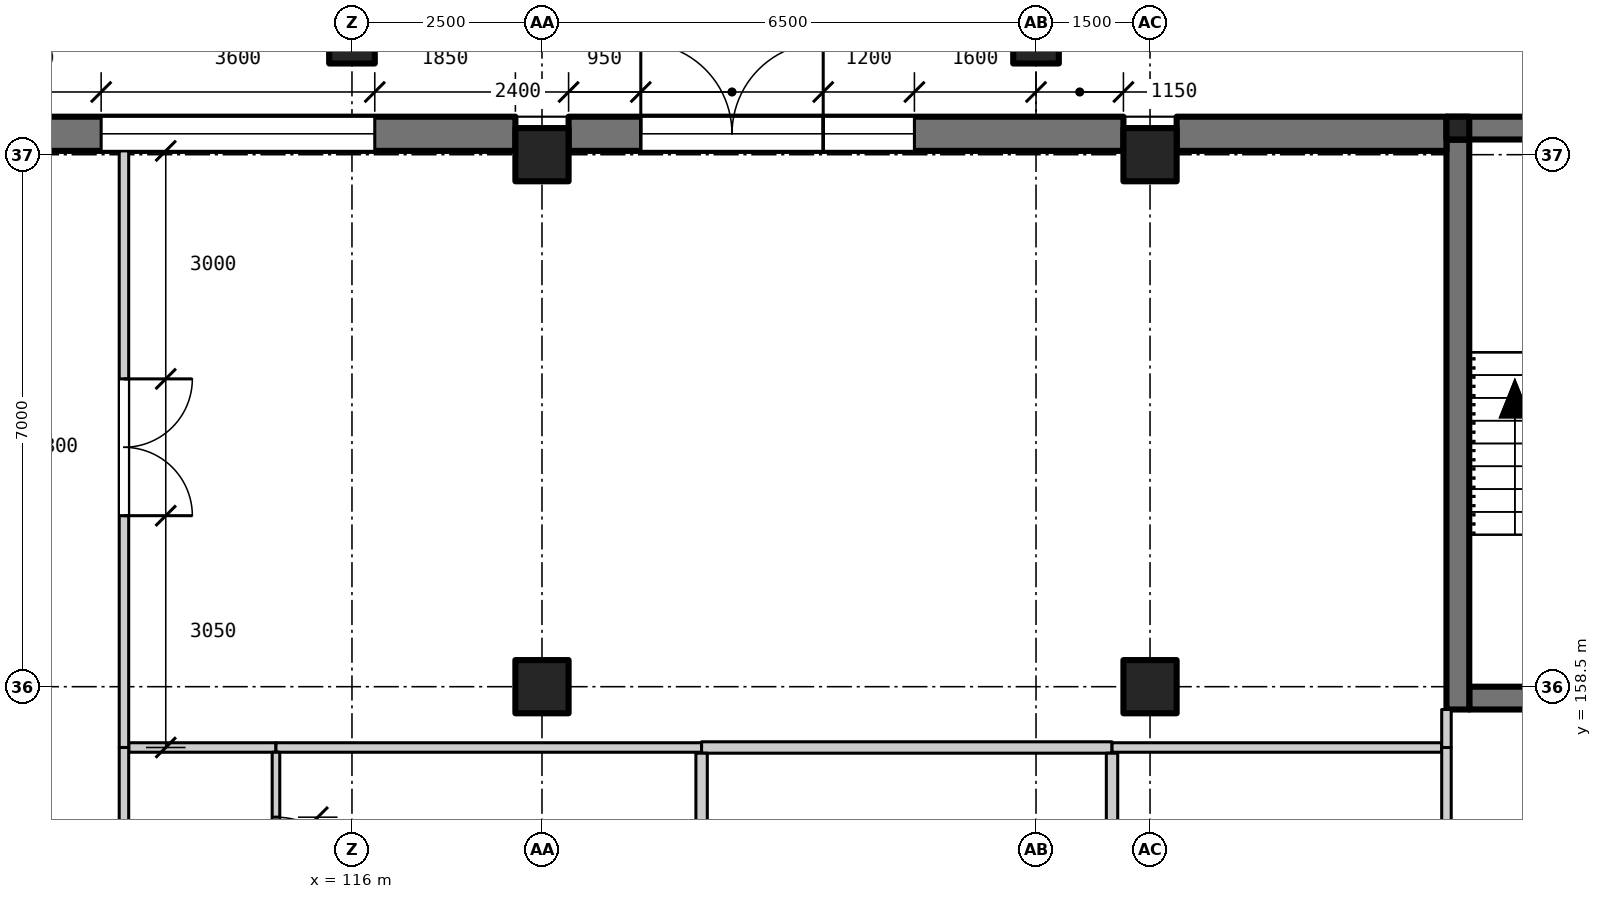
"""IFC4 building model, lengths in metres.
Left out: names, types, materials, properties, quantities, classifications, styles, units other than length and angle.
Written with IfcOpenShell. Run it as: python <this file> out.ifc"""

import sys

from ifc_helpers import new_model, si_unit, direction, frame, frame_2d, origin, origin_2d, place, context, subcontext, project, spatial, rectangle, extrude, element, fill, save


model = new_model("IFC4")
c1 = context("Model", 3, precision=1e-05, world=origin(), true_north=direction((0.0, 1.0)))
c2 = subcontext(c1, "Body", "Model", "MODEL_VIEW")
j1 = project(units=[si_unit("LENGTHUNIT", "METRE"), si_unit("PLANEANGLEUNIT", "RADIAN")], contexts=[c1])
p1 = place(None, origin())
s1 = spatial("IfcSite", under=j1, at=p1, CompositionType="ELEMENT")
p2 = place(p1, origin())
s2 = spatial("IfcBuilding", under=s1, at=p2, CompositionType="ELEMENT")
p3 = place(p2, origin())
s3 = spatial("IfcBuildingStorey", under=s2, at=p3, CompositionType="ELEMENT", Elevation=0.0)
for number, where, z_axis, x_axis in (
    (1, (118.5, 158.5, -1.4), (0.0, 0.0, 1.0), (1.0, 0.0, 0.0)),
    (2, (118.5, 165.5, -1.4), (0.0, 0.0, 1.0), (1.0, 0.0, 0.0)),
    (3, (126.5, 158.5, -1.4), (0.0, 0.0, 1.0), (1.0, 0.0, 0.0)),
    (4, (126.5, 165.5, -1.4), (0.0, 0.0, 1.0), (1.0, 0.0, 0.0)),
):
    element("IfcColumn", number, at=place(p3, frame(where, z_axis=z_axis, x_axis=x_axis)), inside=s3, PredefinedType="COLUMN", context=c2, shape_type="SweptSolid", body=[
        extrude(rectangle(XDim=0.7, YDim=0.7, at=origin_2d()), origin(), (0.0, 0.0, 1.0), 7.4),
    ])
p4 = place(p3, frame((130.55, 165.85, -1.4), z_axis=(0.0, 0.0, 1.0), x_axis=(1.0, 0.0, 0.0)))
e5 = element("IfcColumn", 5, at=p4, inside=s3, PredefinedType="COLUMN", context=c2, shape_type="SweptSolid", body=[
    extrude(rectangle(XDim=0.3, YDim=0.3, at=origin_2d()), origin(), (0.0, 0.0, 1.0), 1.1),
])
for number, where, z_axis, x_axis in (
    (6, (116.0, 167.0, -0.3), (0.0, 0.0, 1.0), (1.0, 0.0, 0.0)),
    (7, (125.0, 167.0, -0.3), (0.0, 0.0, 1.0), (1.0, 0.0, 0.0)),
):
    element("IfcColumn", number, at=place(p3, frame(where, z_axis=z_axis, x_axis=x_axis)), inside=s3, PredefinedType="COLUMN", context=c2, shape_type="SweptSolid", body=[
        extrude(rectangle(XDim=0.6, YDim=0.6, at=origin_2d()), origin(), (0.0, 0.0, 1.0), 6.15),
    ])
p5 = place(p3, frame((130.7, 158.35, -1.4), z_axis=(0.0, 0.0, 1.0), x_axis=(1.0, 0.0, 0.0)))
e8 = element("IfcWall", 8, at=p5, inside=s3, PredefinedType="SHEAR", context=c2, shape_type="SweptSolid", body=[
    extrude(rectangle(XDim=3.0, YDim=0.3, at=frame_2d((1.5, 0.0))), origin(), (0.0, 0.0, 1.0), 7.4),
])
p6 = place(p5, frame((0.95, 0.0, 1.4)))
e9 = element("IfcOpeningElement", 9, at=p6, cuts=e8, PredefinedType="OPENING", context=c2, shape_type="SweptSolid", body=[
    extrude(rectangle(XDim=1.1, YDim=2.1, at=frame_2d((0.55, 1.05))), frame((0.0, 0.16, 0.0), z_axis=(0.0, -1.0, 0.0), x_axis=(1.0, 0.0, 0.0)), (0.0, 0.0, 1.0), 0.32),
])
p7 = place(p3, frame((130.55, 158.2, -1.4), z_axis=(0.0, 0.0, 1.0), x_axis=(0.0, 1.0, 0.0)))
e10 = element("IfcWall", 10, at=p7, inside=s3, PredefinedType="SHEAR", context=c2, shape_type="SweptSolid", body=[
    extrude(rectangle(XDim=7.5, YDim=0.3, at=frame_2d((3.75, 0.0))), origin(), (0.0, 0.0, 1.0), 7.4),
])
p8 = place(p3, frame((130.4, 165.85, 0.0), z_axis=(0.0, 0.0, 1.0), x_axis=(1.0, 0.0, 0.0)))
e11 = element("IfcWall", 11, at=p8, inside=s3, PredefinedType="SOLIDWALL", context=c2, shape_type="SweptSolid", body=[
    extrude(rectangle(XDim=3.6, YDim=0.3, at=frame_2d((1.8, 0.0))), origin(), (0.0, 0.0, 1.0), 5.7),
])
p9 = place(p3, frame((110.85, 165.775, 0.0), z_axis=(0.0, 0.0, 1.0), x_axis=(1.0, 0.0, 0.0)))
e12 = element("IfcWall", 12, at=p9, inside=s3, PredefinedType="SOLIDWALL", context=c2, shape_type="SweptSolid", body=[
    extrude(rectangle(XDim=7.3, YDim=0.45, at=frame_2d((3.65, 0.0))), origin(), (0.0, 0.0, 1.0), 4.9),
])
p10 = place(p9, frame((1.85, 0.0, 0.9)))
e13 = element("IfcOpeningElement", 13, at=p10, cuts=e12, PredefinedType="OPENING", context=c2, shape_type="SweptSolid", body=[
    extrude(rectangle(XDim=3.6, YDim=1.6, at=frame_2d((1.8, 0.8))), frame((0.0, 0.235, 0.0), z_axis=(0.0, -1.0, 0.0), x_axis=(1.0, 0.0, 0.0)), (0.0, 0.0, 1.0), 0.47),
])
p11 = place(p3, frame((118.85, 165.775, 0.0), z_axis=(0.0, 0.0, 1.0), x_axis=(1.0, 0.0, 0.0)))
e14 = element("IfcWall", 14, at=p11, inside=s3, PredefinedType="SOLIDWALL", context=c2, shape_type="SweptSolid", body=[
    extrude(rectangle(XDim=7.3, YDim=0.45, at=frame_2d((3.65, 0.0))), origin(), (0.0, 0.0, 1.0), 4.9),
])
p12 = place(p11, frame((0.95, 0.0, 0.0)))
e15 = element("IfcOpeningElement", 15, at=p12, cuts=e14, PredefinedType="OPENING", context=c2, shape_type="SweptSolid", body=[
    extrude(rectangle(XDim=2.4, YDim=2.4, at=frame_2d((1.2, 1.2))), frame((0.0, 0.235, 0.0), z_axis=(0.0, -1.0, 0.0), x_axis=(1.0, 0.0, 0.0)), (0.0, 0.0, 1.0), 0.47),
])
p13 = place(p11, frame((0.95, 0.0, 2.5)))
e16 = element("IfcOpeningElement", 16, at=p13, cuts=e14, PredefinedType="OPENING", context=c2, shape_type="SweptSolid", body=[
    extrude(rectangle(XDim=2.4, YDim=0.6, at=frame_2d((1.2, 0.3))), frame((0.0, 0.235, 0.0), z_axis=(0.0, -1.0, 0.0), x_axis=(1.0, 0.0, 0.0)), (0.0, 0.0, 1.0), 0.47),
])
p14 = place(p11, frame((3.35, 0.0, 0.4)))
e17 = element("IfcOpeningElement", 17, at=p14, cuts=e14, PredefinedType="OPENING", context=c2, shape_type="SweptSolid", body=[
    extrude(rectangle(XDim=1.2, YDim=3.0, at=frame_2d((0.6, 1.5))), frame((0.0, 0.235, 0.0), z_axis=(0.0, -1.0, 0.0), x_axis=(1.0, 0.0, 0.0)), (0.0, 0.0, 1.0), 0.47),
])
p15 = place(p3, frame((126.85, 165.775, 0.0), z_axis=(0.0, 0.0, 1.0), x_axis=(1.0, 0.0, 0.0)))
e18 = element("IfcWall", 18, at=p15, inside=s3, PredefinedType="SOLIDWALL", context=c2, shape_type="SweptSolid", body=[
    extrude(rectangle(XDim=3.55, YDim=0.45, at=frame_2d((1.775, 0.0))), origin(), (0.0, 0.0, 1.0), 4.9),
])
p16 = place(p3, frame((113.062, 157.7, 0.0), z_axis=(0.0, 0.0, 1.0), x_axis=(1.0, 0.0, 0.0)))
e19 = element("IfcWall", 19, at=p16, inside=s3, PredefinedType="PARTITIONING", context=c2, shape_type="SweptSolid", body=[
    extrude(rectangle(XDim=1.938, YDim=0.125, at=frame_2d((0.969, 0.0))), origin(), (0.0, 0.0, 1.0), 5.7),
])
p17 = place(p3, frame((115.0, 157.7, 0.0), z_axis=(0.0, 0.0, 1.0), x_axis=(1.0, 0.0, 0.0)))
e20 = element("IfcWall", 20, at=p17, inside=s3, PredefinedType="PARTITIONING", context=c2, shape_type="SweptSolid", body=[
    extrude(rectangle(XDim=5.6, YDim=0.125, at=frame_2d((2.8, 0.0))), origin(), (0.0, 0.0, 1.0), 5.7),
])
p18 = place(p3, frame((120.6, 157.7, 0.0), z_axis=(0.0, 0.0, 1.0), x_axis=(1.0, 0.0, 0.0)))
e21 = element("IfcWall", 21, at=p18, inside=s3, PredefinedType="PARTITIONING", context=c2, shape_type="SweptSolid", body=[
    extrude(rectangle(XDim=5.4, YDim=0.15, at=frame_2d((2.7, 0.0))), origin(), (0.0, 0.0, 1.0), 5.7),
])
p19 = place(p3, frame((126.0, 157.7, 0.0), z_axis=(0.0, 0.0, 1.0), x_axis=(1.0, 0.0, 0.0)))
e22 = element("IfcWall", 22, at=p19, inside=s3, PredefinedType="PARTITIONING", context=c2, shape_type="SweptSolid", body=[
    extrude(rectangle(XDim=4.337, YDim=0.125, at=frame_2d((2.169, 0.0))), origin(), (0.0, 0.0, 1.0), 5.7),
])
p20 = place(p3, frame((113.0, 149.41, 0.0), z_axis=(0.0, 0.0, 1.0), x_axis=(0.0, 1.0, 0.0)))
e23 = element("IfcWall", 23, at=p20, inside=s3, PredefinedType="PARTITIONING", context=c2, shape_type="SweptSolid", body=[
    extrude(rectangle(XDim=8.29, YDim=0.125, at=frame_2d((4.145, 0.0))), origin(), (0.0, 0.0, 1.0), 5.7),
])
p21 = place(p3, frame((113.0, 157.7, 0.0), z_axis=(0.0, 0.0, 1.0), x_axis=(0.0, 1.0, 0.0)))
e24 = element("IfcWall", 24, at=p21, inside=s3, PredefinedType="PARTITIONING", context=c2, shape_type="SweptSolid", body=[
    extrude(rectangle(XDim=7.85, YDim=0.125, at=frame_2d((3.925, 0.0))), origin(), (0.0, 0.0, 1.0), 5.7),
])
p22 = place(p21, frame((3.05, 0.0, 0.0)))
e25 = element("IfcOpeningElement", 25, at=p22, cuts=e24, PredefinedType="OPENING", context=c2, shape_type="SweptSolid", body=[
    extrude(rectangle(XDim=1.8, YDim=2.1, at=frame_2d((0.9, 1.05))), frame((0.0, 0.073, 0.0), z_axis=(0.0, -1.0, 0.0), x_axis=(1.0, 0.0, 0.0)), (0.0, 0.0, 1.0), 0.145),
])
p23 = place(p3, frame((115.0, 154.933, 0.0), z_axis=(0.0, 0.0, 1.0), x_axis=(0.0, 1.0, 0.0)))
e26 = element("IfcWall", 26, at=p23, inside=s3, PredefinedType="PARTITIONING", context=c2, shape_type="SweptSolid", body=[
    extrude(rectangle(XDim=2.704, YDim=0.1, at=frame_2d((1.352, 0.0))), origin(), (0.0, 0.0, 1.0), 5.7),
])
p24 = place(p23, frame((0.85, 0.0, 0.0)))
e27 = element("IfcOpeningElement", 27, at=p24, cuts=e26, PredefinedType="OPENING", context=c2, shape_type="SweptSolid", body=[
    extrude(rectangle(XDim=1.0, YDim=2.1, at=frame_2d((0.5, 1.05))), frame((0.0, 0.06, 0.0), z_axis=(0.0, -1.0, 0.0), x_axis=(1.0, 0.0, 0.0)), (0.0, 0.0, 1.0), 0.12),
])
p25 = place(p3, frame((120.6, 154.933, 0.0), z_axis=(0.0, 0.0, 1.0), x_axis=(0.0, 1.0, 0.0)))
e28 = element("IfcWall", 28, at=p25, inside=s3, PredefinedType="PARTITIONING", context=c2, shape_type="SweptSolid", body=[
    extrude(rectangle(XDim=2.692, YDim=0.15, at=frame_2d((1.346, 0.0))), origin(), (0.0, 0.0, 1.0), 5.7),
])
p26 = place(p3, frame((126.0, 149.475, 0.0), z_axis=(0.0, 0.0, 1.0), x_axis=(0.0, 1.0, 0.0)))
e29 = element("IfcWall", 29, at=p26, inside=s3, PredefinedType="PARTITIONING", context=c2, shape_type="SweptSolid", body=[
    extrude(rectangle(XDim=8.15, YDim=0.15, at=frame_2d((4.075, 0.0))), origin(), (0.0, 0.0, 1.0), 5.7),
])
p27 = place(p3, frame((130.4, 149.41, 0.0), z_axis=(0.0, 0.0, 1.0), x_axis=(0.0, 1.0, 0.0)))
e30 = element("IfcWall", 30, at=p27, inside=s3, PredefinedType="PARTITIONING", context=c2, shape_type="SweptSolid", body=[
    extrude(rectangle(XDim=8.29, YDim=0.125, at=frame_2d((4.145, 0.0))), origin(), (0.0, 0.0, 1.0), 5.7),
])
p28 = place(p3, frame((130.4, 157.7, 0.0), z_axis=(0.0, 0.0, 1.0), x_axis=(0.0, 1.0, 0.0)))
e31 = element("IfcWall", 31, at=p28, inside=s3, PredefinedType="PARTITIONING", context=c2, shape_type="SweptSolid", body=[
    extrude(rectangle(XDim=0.5, YDim=0.125, at=frame_2d((0.25, 0.0))), origin(), (0.0, 0.0, 1.0), 5.7),
])
p29 = place(p10, origin())
e32 = element("IfcWindow", 32, at=p29, inside=s3, PartitioningType="SINGLE_PANEL", PredefinedType="WINDOW", context=c2, shape_type="SweptSolid", body=[
    extrude(rectangle(XDim=3.6, YDim=1.6, at=frame_2d((1.8, 0.8))), frame((0.0, -0.125, 0.0), z_axis=(0.0, -1.0, 0.0), x_axis=(1.0, 0.0, 0.0)), (0.0, 0.0, 1.0), 0.06),
])
fill(e13, e32)
p30 = place(p12, origin())
e33 = element("IfcDoor", 33, at=p30, inside=s3, OperationType="DOUBLE_DOOR_DOUBLE_SWING", PredefinedType="DOOR", context=c2, shape_type="SweptSolid", body=[
    extrude(rectangle(XDim=2.4, YDim=2.4, at=frame_2d((1.2, 1.2))), frame((0.0, 0.025, 0.0), z_axis=(0.0, -1.0, 0.0), x_axis=(1.0, 0.0, 0.0)), (0.0, 0.0, 1.0), 0.05),
])
fill(e15, e33)
p31 = place(p13, origin())
e34 = element("IfcWindow", 34, at=p31, inside=s3, PartitioningType="SINGLE_PANEL", PredefinedType="WINDOW", context=c2, shape_type="SweptSolid", body=[
    extrude(rectangle(XDim=2.4, YDim=0.6, at=frame_2d((1.2, 0.3))), frame((0.0, 0.025, 0.0), z_axis=(0.0, -1.0, 0.0), x_axis=(1.0, 0.0, 0.0)), (0.0, 0.0, 1.0), 0.06),
])
fill(e16, e34)
p32 = place(p14, origin())
e35 = element("IfcWindow", 35, at=p32, inside=s3, PartitioningType="SINGLE_PANEL", PredefinedType="WINDOW", context=c2, shape_type="SweptSolid", body=[
    extrude(rectangle(XDim=1.2, YDim=3.0, at=frame_2d((0.6, 1.5))), frame((0.0, 0.025, 0.0), z_axis=(0.0, -1.0, 0.0), x_axis=(1.0, 0.0, 0.0)), (0.0, 0.0, 1.0), 0.06),
])
fill(e17, e35)
p33 = place(p24, frame((1.0, 0.0, 0.0), z_axis=(0.0, 0.0, 1.0), x_axis=(-1.0, 0.0, 0.0)))
e36 = element("IfcDoor", 36, at=p33, inside=s3, OperationType="SINGLE_SWING_RIGHT", PredefinedType="DOOR", context=c2, shape_type="SweptSolid", body=[
    extrude(rectangle(XDim=1.0, YDim=2.1, at=frame_2d((0.5, 1.05))), frame((0.0, 0.025, 0.0), z_axis=(0.0, -1.0, 0.0), x_axis=(1.0, 0.0, 0.0)), (0.0, 0.0, 1.0), 0.05),
])
fill(e27, e36)
p34 = place(p22, frame((1.8, 0.0, 0.0), z_axis=(0.0, 0.0, 1.0), x_axis=(-1.0, 0.0, 0.0)))
e37 = element("IfcDoor", 37, at=p34, inside=s3, OperationType="DOUBLE_DOOR_SINGLE_SWING", PredefinedType="DOOR", context=c2, shape_type="SweptSolid", body=[
    extrude(rectangle(XDim=1.8, YDim=2.1, at=frame_2d((0.9, 1.05))), frame((0.0, 0.025, 0.0), z_axis=(0.0, -1.0, 0.0), x_axis=(1.0, 0.0, 0.0)), (0.0, 0.0, 1.0), 0.05),
])
fill(e25, e37)
save(model, sys.argv[1])
